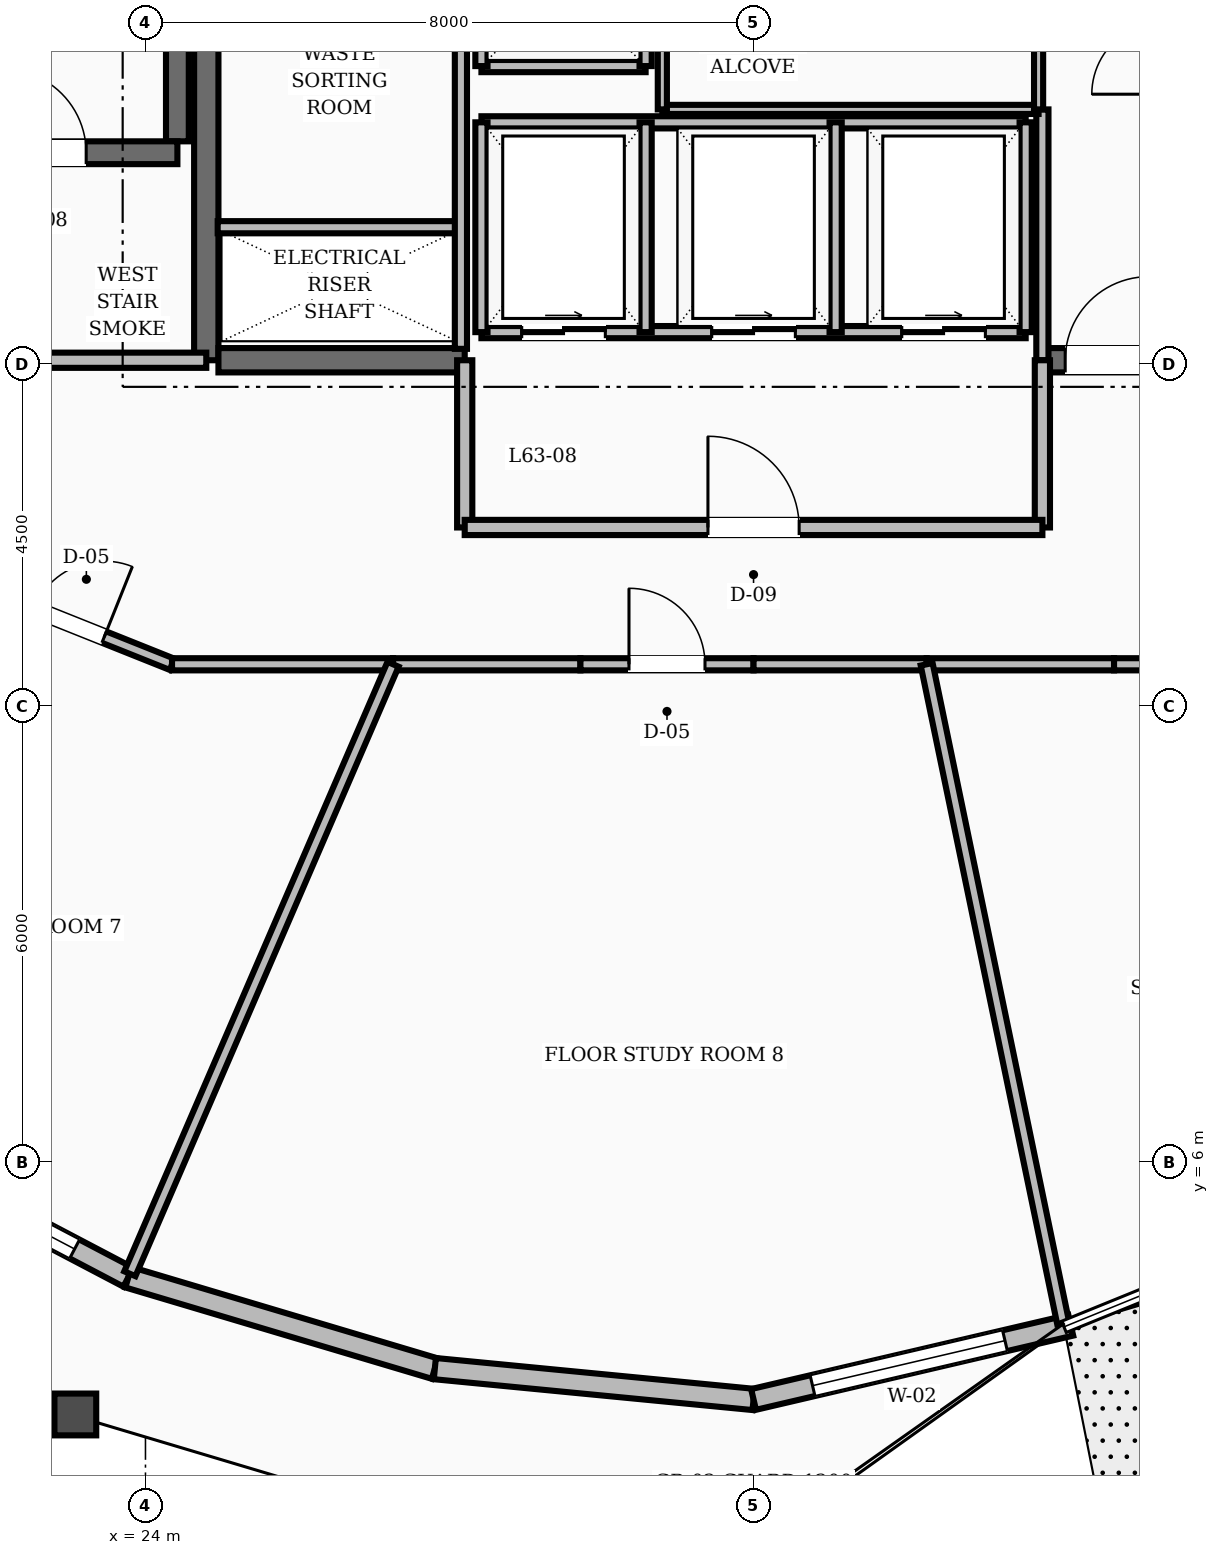
"""IFC4 building model, lengths in metres.
Left out: names, types, materials, properties, quantities, classifications, styles, units other than length and angle.
Written with IfcOpenShell. Run it as: python <this file> out.ifc"""

import sys

from ifc_helpers import new_model, si_unit, direction, frame, frame_2d, origin, place, context, subcontext, project, spatial, rectangle, extrude, element, fill, save


model = new_model("IFC4")
c1 = context("Model", 3, precision=1e-05, world=origin(), true_north=direction((0.0, 1.0)))
c2 = subcontext(c1, "Body", "Model", "MODEL_VIEW")
j1 = project(units=[si_unit("LENGTHUNIT", "METRE"), si_unit("PLANEANGLEUNIT", "RADIAN")], contexts=[c1])
p1 = place(None, origin())
s1 = spatial("IfcSite", under=j1, at=p1, CompositionType="ELEMENT")
p2 = place(p1, origin())
s2 = spatial("IfcBuilding", under=s1, at=p2, CompositionType="ELEMENT")
p3 = place(p2, frame((0.0, 0.0, 243.6)))
s3 = spatial("IfcBuildingStorey", under=s2, at=p3, CompositionType="ELEMENT", Elevation=243.6)
p4 = place(p3, frame((24.8, 16.55, 0.0), z_axis=(0.0, 0.0, 1.0), x_axis=(0.0, 1.0, 0.0)))
e1 = element("IfcWall", 1, at=p4, inside=s3, PredefinedType="SHEAR", context=c2, shape_type="SweptSolid", body=[
    extrude(rectangle(XDim=6.3, YDim=0.32, at=frame_2d((3.15, 0.0))), origin(), (0.0, 0.0, 1.0), 3.6),
])
p5 = place(p3, frame((24.96, 16.55, 0.0), z_axis=(0.0, 0.0, 1.0), x_axis=(1.0, 0.0, 0.0)))
e2 = element("IfcWall", 2, at=p5, inside=s3, PredefinedType="SHEAR", context=c2, shape_type="SweptSolid", body=[
    extrude(rectangle(XDim=3.24, YDim=0.32, at=frame_2d((1.62, 0.0))), origin(), (0.0, 0.0, 1.0), 3.6),
])
p6 = place(p3, frame((35.8, 16.55, 0.0), z_axis=(0.0, 0.0, 1.0), x_axis=(1.0, 0.0, 0.0)))
e3 = element("IfcWall", 3, at=p6, inside=s3, PredefinedType="SHEAR", context=c2, shape_type="SweptSolid", body=[
    extrude(rectangle(XDim=3.24, YDim=0.32, at=frame_2d((1.62, 0.0))), origin(), (0.0, 0.0, 1.0), 3.6),
])
p7 = place(p6, frame((0.3, 0.0, 0.0)))
e4 = element("IfcOpeningElement", 4, at=p7, cuts=e3, PredefinedType="OPENING", context=c2, shape_type="SweptSolid", body=[
    extrude(rectangle(XDim=1.1, YDim=2.1, at=frame_2d((0.55, 1.05))), frame((0.0, 0.17, 0.0), z_axis=(0.0, -1.0, 0.0), x_axis=(1.0, 0.0, 0.0)), (0.0, 0.0, 1.0), 0.34),
])
p8 = place(p3, frame((24.42, 19.43, 0.0), z_axis=(0.0, 0.0, 1.0), x_axis=(0.0, 1.0, 0.0)))
e5 = element("IfcWall", 5, at=p8, inside=s3, PredefinedType="SHEAR", context=c2, shape_type="SweptSolid", body=[
    extrude(rectangle(XDim=8.74, YDim=0.3, at=frame_2d((4.37, 0.0))), origin(), (0.0, 0.0, 1.0), 3.6),
])
p9 = place(p3, frame((20.82, 19.28, 0.0), z_axis=(0.0, 0.0, 1.0), x_axis=(1.0, 0.0, 0.0)))
e6 = element("IfcWall", 6, at=p9, inside=s3, PredefinedType="SHEAR", context=c2, shape_type="SweptSolid", body=[
    extrude(rectangle(XDim=3.6, YDim=0.3, at=frame_2d((1.8, 0.0))), origin(), (0.0, 0.0, 1.0), 3.6),
])
p10 = place(p9, frame((1.3, 0.0, 0.0)))
e7 = element("IfcOpeningElement", 7, at=p10, cuts=e6, PredefinedType="OPENING", context=c2, shape_type="SweptSolid", body=[
    extrude(rectangle(XDim=1.1, YDim=2.1, at=frame_2d((0.55, 1.05))), frame((0.0, 0.16, 0.0), z_axis=(0.0, -1.0, 0.0), x_axis=(1.0, 0.0, 0.0)), (0.0, 0.0, 1.0), 0.32),
])
p11 = place(p3, frame((20.059, 6.438, 0.0), z_axis=(0.0, 0.0, 1.0), x_axis=(0.885290153249, -0.46503907853, 0.0)))
e8 = element("IfcWall", 8, at=p11, inside=s3, PredefinedType="STANDARD", context=c2, shape_type="SweptSolid", body=[
    extrude(rectangle(XDim=4.197, YDim=0.28, at=frame_2d((2.099, 0.0))), origin(), (0.0, 0.0, 1.0), 2.88),
])
p12 = place(p11, frame((0.799, 0.0, 0.8)))
e9 = element("IfcOpeningElement", 9, at=p12, cuts=e8, PredefinedType="OPENING", context=c2, shape_type="SweptSolid", body=[
    extrude(rectangle(XDim=2.6, YDim=1.65, at=frame_2d((1.3, 0.825))), frame((0.0, 0.15, 0.0), z_axis=(0.0, -1.0, 0.0), x_axis=(1.0, 0.0, 0.0)), (0.0, 0.0, 1.0), 0.3),
])
p13 = place(p3, frame((23.775, 4.486, 0.0), z_axis=(0.0, 0.0, 1.0), x_axis=(0.958312014412, -0.285723788009, 0.0)))
e10 = element("IfcWall", 10, at=p13, inside=s3, PredefinedType="STANDARD", context=c2, shape_type="SweptSolid", body=[
    extrude(rectangle(XDim=4.207, YDim=0.28, at=frame_2d((2.104, 0.0))), origin(), (0.0, 0.0, 1.0), 2.88),
])
p14 = place(p3, frame((27.807, 3.284, 0.0), z_axis=(0.0, 0.0, 1.0), x_axis=(0.995350551252, -0.096318638497, 0.0)))
e11 = element("IfcWall", 11, at=p14, inside=s3, PredefinedType="STANDARD", context=c2, shape_type="SweptSolid", body=[
    extrude(rectangle(XDim=4.213, YDim=0.28, at=frame_2d((2.106, 0.0))), origin(), (0.0, 0.0, 1.0), 2.88),
])
p15 = place(p3, frame((32.0, 2.878, 0.0), z_axis=(0.0, 0.0, 1.0), x_axis=(0.973725543954, 0.227724757223, 0.0)))
e12 = element("IfcWall", 12, at=p15, inside=s3, PredefinedType="STANDARD", context=c2, shape_type="SweptSolid", body=[
    extrude(rectangle(XDim=4.286, YDim=0.28, at=frame_2d((2.143, 0.0))), origin(), (0.0, 0.0, 1.0), 2.88),
])
p16 = place(p15, frame((0.797, 0.0, 0.8)))
e13 = element("IfcOpeningElement", 13, at=p16, cuts=e12, PredefinedType="OPENING", context=c2, shape_type="SweptSolid", body=[
    extrude(rectangle(XDim=2.6, YDim=1.65, at=frame_2d((1.3, 0.825))), frame((0.0, 0.15, 0.0), z_axis=(0.0, -1.0, 0.0), x_axis=(1.0, 0.0, 0.0)), (0.0, 0.0, 1.0), 0.3),
])
p17 = place(p3, frame((20.82, 16.55, 0.0), z_axis=(0.0, 0.0, 1.0), x_axis=(1.0, 0.0, 0.0)))
e14 = element("IfcWall", 14, at=p17, inside=s3, PredefinedType="SOLIDWALL", context=c2, shape_type="SweptSolid", body=[
    extrude(rectangle(XDim=3.98, YDim=0.2, at=frame_2d((1.99, 0.0))), origin(), (0.0, 0.0, 1.0), 2.87),
])
p18 = place(p3, frame((35.8, 16.55, 0.0), z_axis=(0.0, 0.0, 1.0), x_axis=(0.0, 1.0, 0.0)))
e15 = element("IfcWall", 15, at=p18, inside=s3, PredefinedType="SOLIDWALL", context=c2, shape_type="SweptSolid", body=[
    extrude(rectangle(XDim=3.3, YDim=0.16, at=frame_2d((1.65, 0.0))), origin(), (0.0, 0.0, 1.0), 2.87),
])
for number, where, z_axis, x_axis in (
    (16, (28.2, 14.35, 0.0), (0.0, 0.0, 1.0), (0.0, 1.0, 0.0)),
    (17, (35.8, 14.35, 0.0), (0.0, 0.0, 1.0), (0.0, 1.0, 0.0)),
):
    element("IfcWall", number, at=place(p3, frame(where, z_axis=z_axis, x_axis=x_axis)), inside=s3, PredefinedType="SOLIDWALL", context=c2, shape_type="SweptSolid", body=[
        extrude(rectangle(XDim=2.2, YDim=0.2, at=frame_2d((1.1, 0.0))), origin(), (0.0, 0.0, 1.0), 2.87),
    ])
p19 = place(p3, frame((28.2, 14.35, 0.0), z_axis=(0.0, 0.0, 1.0), x_axis=(1.0, 0.0, 0.0)))
e18 = element("IfcWall", 18, at=p19, inside=s3, PredefinedType="SOLIDWALL", context=c2, shape_type="SweptSolid", body=[
    extrude(rectangle(XDim=7.6, YDim=0.2, at=frame_2d((3.8, 0.0))), origin(), (0.0, 0.0, 1.0), 2.87),
])
p20 = place(p19, frame((3.2, 0.0, 0.0)))
e19 = element("IfcOpeningElement", 19, at=p20, cuts=e18, PredefinedType="OPENING", context=c2, shape_type="SweptSolid", body=[
    extrude(rectangle(XDim=1.2, YDim=2.1, at=frame_2d((0.6, 1.05))), frame((0.0, 0.11, 0.0), z_axis=(0.0, -1.0, 0.0), x_axis=(1.0, 0.0, 0.0)), (0.0, 0.0, 1.0), 0.22),
])
for number, where, z_axis, x_axis in (
    (20, (28.42, 20.42, 0.0), (0.0, 0.0, 1.0), (1.0, 0.0, 0.0)),
    (21, (28.42, 20.42, 0.0), (0.0, 0.0, 1.0), (0.0, 1.0, 0.0)),
    (22, (30.58, 20.42, 0.0), (0.0, 0.0, 1.0), (0.0, 1.0, 0.0)),
):
    element("IfcWall", number, at=place(p3, frame(where, z_axis=z_axis, x_axis=x_axis)), inside=s3, PredefinedType="SOLIDWALL", context=c2, shape_type="SweptSolid", body=[
        extrude(rectangle(XDim=2.16, YDim=0.16, at=frame_2d((1.08, 0.0))), origin(), (0.0, 0.0, 1.0), 2.87),
    ])
p21 = place(p3, frame((28.42, 16.92, 0.0), z_axis=(0.0, 0.0, 1.0), x_axis=(1.0, 0.0, 0.0)))
e23 = element("IfcWall", 23, at=p21, inside=s3, PredefinedType="SOLIDWALL", context=c2, shape_type="SweptSolid", body=[
    extrude(rectangle(XDim=7.16, YDim=0.16, at=frame_2d((3.58, 0.0))), origin(), (0.0, 0.0, 1.0), 2.87),
])
p22 = place(p21, frame((0.53, 0.0, 0.0)))
e24 = element("IfcOpeningElement", 24, at=p22, cuts=e23, PredefinedType="OPENING", context=c2, shape_type="SweptSolid", body=[
    extrude(rectangle(XDim=1.1, YDim=2.15, at=frame_2d((0.55, 1.075))), frame((0.0, 0.09, 0.0), z_axis=(0.0, -1.0, 0.0), x_axis=(1.0, 0.0, 0.0)), (0.0, 0.0, 1.0), 0.18),
])
p23 = place(p21, frame((3.03, 0.0, 0.0)))
e25 = element("IfcOpeningElement", 25, at=p23, cuts=e23, PredefinedType="OPENING", context=c2, shape_type="SweptSolid", body=[
    extrude(rectangle(XDim=1.1, YDim=2.15, at=frame_2d((0.55, 1.075))), frame((0.0, 0.09, 0.0), z_axis=(0.0, -1.0, 0.0), x_axis=(1.0, 0.0, 0.0)), (0.0, 0.0, 1.0), 0.18),
])
p24 = place(p21, frame((5.53, 0.0, 0.0)))
e26 = element("IfcOpeningElement", 26, at=p24, cuts=e23, PredefinedType="OPENING", context=c2, shape_type="SweptSolid", body=[
    extrude(rectangle(XDim=1.1, YDim=2.15, at=frame_2d((0.55, 1.075))), frame((0.0, 0.09, 0.0), z_axis=(0.0, -1.0, 0.0), x_axis=(1.0, 0.0, 0.0)), (0.0, 0.0, 1.0), 0.18),
])
p25 = place(p3, frame((28.42, 19.68, 0.0), z_axis=(0.0, 0.0, 1.0), x_axis=(1.0, 0.0, 0.0)))
e27 = element("IfcWall", 27, at=p25, inside=s3, PredefinedType="SOLIDWALL", context=c2, shape_type="SweptSolid", body=[
    extrude(rectangle(XDim=7.16, YDim=0.16, at=frame_2d((3.58, 0.0))), origin(), (0.0, 0.0, 1.0), 2.87),
])
for number, where, z_axis, x_axis in (
    (28, (28.42, 16.92, 0.0), (0.0, 0.0, 1.0), (0.0, 1.0, 0.0)),
    (29, (30.58, 16.92, 0.0), (0.0, 0.0, 1.0), (0.0, 1.0, 0.0)),
    (30, (33.08, 16.92, 0.0), (0.0, 0.0, 1.0), (0.0, 1.0, 0.0)),
    (31, (35.58, 16.92, 0.0), (0.0, 0.0, 1.0), (0.0, 1.0, 0.0)),
):
    element("IfcWall", number, at=place(p3, frame(where, z_axis=z_axis, x_axis=x_axis)), inside=s3, PredefinedType="SOLIDWALL", context=c2, shape_type="SweptSolid", body=[
        extrude(rectangle(XDim=2.76, YDim=0.16, at=frame_2d((1.38, 0.0))), origin(), (0.0, 0.0, 1.0), 2.87),
    ])
p26 = place(p3, frame((30.8, 19.85, 0.0), z_axis=(0.0, 0.0, 1.0), x_axis=(1.0, 0.0, 0.0)))
e32 = element("IfcWall", 32, at=p26, inside=s3, PredefinedType="PARTITIONING", context=c2, shape_type="SweptSolid", body=[
    extrude(rectangle(XDim=4.95, YDim=0.12, at=frame_2d((2.475, 0.0))), origin(), (0.0, 0.0, 1.0), 2.87),
])
for number, where, z_axis, x_axis in (
    (33, (30.8, 19.85, 0.0), (0.0, 0.0, 1.0), (0.0, 1.0, 0.0)),
    (34, (35.75, 19.85, 0.0), (0.0, 0.0, 1.0), (0.0, 1.0, 0.0)),
):
    element("IfcWall", number, at=place(p3, frame(where, z_axis=z_axis, x_axis=x_axis)), inside=s3, PredefinedType="PARTITIONING", context=c2, shape_type="SweptSolid", body=[
        extrude(rectangle(XDim=2.83, YDim=0.12, at=frame_2d((1.415, 0.0))), origin(), (0.0, 0.0, 1.0), 2.87),
    ])
p27 = place(p3, frame((24.95, 18.3, 0.0), z_axis=(0.0, 0.0, 1.0), x_axis=(1.0, 0.0, 0.0)))
e35 = element("IfcWall", 35, at=p27, inside=s3, PredefinedType="SOLIDWALL", context=c2, shape_type="SweptSolid", body=[
    extrude(rectangle(XDim=3.2, YDim=0.16, at=frame_2d((1.6, 0.0))), origin(), (0.0, 0.0, 1.0), 2.87),
])
p28 = place(p3, frame((28.15, 16.7, 0.0), z_axis=(0.0, 0.0, 1.0), x_axis=(0.0, 1.0, 0.0)))
e36 = element("IfcWall", 36, at=p28, inside=s3, PredefinedType="SOLIDWALL", context=c2, shape_type="SweptSolid", body=[
    extrude(rectangle(XDim=6.05, YDim=0.16, at=frame_2d((3.025, 0.0))), origin(), (0.0, 0.0, 1.0), 2.87),
])
p29 = place(p3, frame((21.635, 13.635, 0.0), z_axis=(0.0, 0.0, 1.0), x_axis=(0.92856882165, -0.371160266542, 0.0)))
e37 = element("IfcWall", 37, at=p29, inside=s3, PredefinedType="SOLIDWALL", context=c2, shape_type="SweptSolid", body=[
    extrude(rectangle(XDim=2.923, YDim=0.16, at=frame_2d((1.461, 0.0))), origin(), (0.0, 0.0, 1.0), 2.87),
])
p30 = place(p29, frame((0.962, 0.0, 0.0)))
e38 = element("IfcOpeningElement", 38, at=p30, cuts=e37, PredefinedType="OPENING", context=c2, shape_type="SweptSolid", body=[
    extrude(rectangle(XDim=1.0, YDim=2.1, at=frame_2d((0.5, 1.05))), frame((0.0, 0.09, 0.0), z_axis=(0.0, -1.0, 0.0), x_axis=(1.0, 0.0, 0.0)), (0.0, 0.0, 1.0), 0.18),
])
p31 = place(p3, frame((24.349, 12.55, 0.0), z_axis=(0.0, 0.0, 1.0), x_axis=(1.0, 0.0, 0.0)))
e39 = element("IfcWall", 39, at=p31, inside=s3, PredefinedType="SOLIDWALL", context=c2, shape_type="SweptSolid", body=[
    extrude(rectangle(XDim=2.908, YDim=0.16, at=frame_2d((1.454, 0.0))), origin(), (0.0, 0.0, 1.0), 2.87),
])
p32 = place(p3, frame((27.257, 12.55, 0.0), z_axis=(0.0, 0.0, 1.0), x_axis=(1.0, 0.0, 0.0)))
e40 = element("IfcWall", 40, at=p32, inside=s3, PredefinedType="SOLIDWALL", context=c2, shape_type="SweptSolid", body=[
    extrude(rectangle(XDim=2.465, YDim=0.16, at=frame_2d((1.232, 0.0))), origin(), (0.0, 0.0, 1.0), 2.87),
])
p33 = place(p3, frame((29.722, 12.55, 0.0), z_axis=(0.0, 0.0, 1.0), x_axis=(1.0, 0.0, 0.0)))
e41 = element("IfcWall", 41, at=p33, inside=s3, PredefinedType="SOLIDWALL", context=c2, shape_type="SweptSolid", body=[
    extrude(rectangle(XDim=2.278, YDim=0.16, at=frame_2d((1.139, 0.0))), origin(), (0.0, 0.0, 1.0), 2.87),
])
p34 = place(p33, frame((0.639, 0.0, 0.0)))
e42 = element("IfcOpeningElement", 42, at=p34, cuts=e41, PredefinedType="OPENING", context=c2, shape_type="SweptSolid", body=[
    extrude(rectangle(XDim=1.0, YDim=2.1, at=frame_2d((0.5, 1.05))), frame((0.0, 0.09, 0.0), z_axis=(0.0, -1.0, 0.0), x_axis=(1.0, 0.0, 0.0)), (0.0, 0.0, 1.0), 0.18),
])
p35 = place(p3, frame((32.0, 12.55, 0.0), z_axis=(0.0, 0.0, 1.0), x_axis=(1.0, 0.0, 0.0)))
e43 = element("IfcWall", 43, at=p35, inside=s3, PredefinedType="SOLIDWALL", context=c2, shape_type="SweptSolid", body=[
    extrude(rectangle(XDim=2.278, YDim=0.16, at=frame_2d((1.139, 0.0))), origin(), (0.0, 0.0, 1.0), 2.87),
])
p36 = place(p3, frame((34.278, 12.55, 0.0), z_axis=(0.0, 0.0, 1.0), x_axis=(1.0, 0.0, 0.0)))
e44 = element("IfcWall", 44, at=p36, inside=s3, PredefinedType="SOLIDWALL", context=c2, shape_type="SweptSolid", body=[
    extrude(rectangle(XDim=2.465, YDim=0.16, at=frame_2d((1.232, 0.0))), origin(), (0.0, 0.0, 1.0), 2.87),
])
p37 = place(p3, frame((36.743, 12.55, 0.0), z_axis=(0.0, 0.0, 1.0), x_axis=(1.0, 0.0, 0.0)))
e45 = element("IfcWall", 45, at=p37, inside=s3, PredefinedType="SOLIDWALL", context=c2, shape_type="SweptSolid", body=[
    extrude(rectangle(XDim=2.908, YDim=0.16, at=frame_2d((1.454, 0.0))), origin(), (0.0, 0.0, 1.0), 2.87),
])
p38 = place(p37, frame((0.954, 0.0, 0.0)))
e46 = element("IfcOpeningElement", 46, at=p38, cuts=e45, PredefinedType="OPENING", context=c2, shape_type="SweptSolid", body=[
    extrude(rectangle(XDim=1.0, YDim=2.1, at=frame_2d((0.5, 1.05))), frame((0.0, 0.09, 0.0), z_axis=(0.0, -1.0, 0.0), x_axis=(1.0, 0.0, 0.0)), (0.0, 0.0, 1.0), 0.18),
])
p39 = place(p3, frame((27.257, 12.55, 0.0), z_axis=(0.0, 0.0, 1.0), x_axis=(-0.396464931031, -0.918049867089, 0.0)))
e47 = element("IfcWall", 47, at=p39, inside=s3, PredefinedType="SOLIDWALL", context=c2, shape_type="SweptSolid", body=[
    extrude(rectangle(XDim=8.734, YDim=0.16, at=frame_2d((4.367, 0.0))), origin(), (0.0, 0.0, 1.0), 2.87),
])
p40 = place(p3, frame((34.278, 12.55, 0.0), z_axis=(0.0, 0.0, 1.0), x_axis=(0.202911120266, -0.979197159551, 0.0)))
e48 = element("IfcWall", 48, at=p40, inside=s3, PredefinedType="SOLIDWALL", context=c2, shape_type="SweptSolid", body=[
    extrude(rectangle(XDim=8.852, YDim=0.16, at=frame_2d((4.426, 0.0))), origin(), (0.0, 0.0, 1.0), 2.87),
])
p41 = place(p12, origin())
e49 = element("IfcWindow", 49, at=p41, inside=s3, PartitioningType="SINGLE_PANEL", PredefinedType="WINDOW", context=c2, shape_type="SweptSolid", body=[
    extrude(rectangle(XDim=2.6, YDim=1.65, at=frame_2d((1.3, 0.825))), frame((0.0, 0.03, 0.0), z_axis=(0.0, -1.0, 0.0), x_axis=(1.0, 0.0, 0.0)), (0.0, 0.0, 1.0), 0.06),
])
fill(e9, e49)
p42 = place(p16, origin())
e50 = element("IfcWindow", 50, at=p42, inside=s3, PartitioningType="SINGLE_PANEL", PredefinedType="WINDOW", context=c2, shape_type="SweptSolid", body=[
    extrude(rectangle(XDim=2.6, YDim=1.65, at=frame_2d((1.3, 0.825))), frame((0.0, 0.03, 0.0), z_axis=(0.0, -1.0, 0.0), x_axis=(1.0, 0.0, 0.0)), (0.0, 0.0, 1.0), 0.06),
])
fill(e13, e50)
p43 = place(p10, origin())
e51 = element("IfcDoor", 51, at=p43, inside=s3, OperationType="SINGLE_SWING_LEFT", PredefinedType="DOOR", context=c2, shape_type="SweptSolid", body=[
    extrude(rectangle(XDim=1.1, YDim=2.1, at=frame_2d((0.55, 1.05))), frame((0.0, 0.025, 0.0), z_axis=(0.0, -1.0, 0.0), x_axis=(1.0, 0.0, 0.0)), (0.0, 0.0, 1.0), 0.05),
])
fill(e7, e51)
p44 = place(p7, origin())
e52 = element("IfcDoor", 52, at=p44, inside=s3, OperationType="SINGLE_SWING_RIGHT", PredefinedType="DOOR", context=c2, shape_type="SweptSolid", body=[
    extrude(rectangle(XDim=1.1, YDim=2.1, at=frame_2d((0.55, 1.05))), frame((0.0, 0.025, 0.0), z_axis=(0.0, -1.0, 0.0), x_axis=(1.0, 0.0, 0.0)), (0.0, 0.0, 1.0), 0.05),
])
fill(e4, e52)
p45 = place(p20, origin())
e53 = element("IfcDoor", 53, at=p45, inside=s3, OperationType="SINGLE_SWING_LEFT", PredefinedType="DOOR", context=c2, shape_type="SweptSolid", body=[
    extrude(rectangle(XDim=1.2, YDim=2.1, at=frame_2d((0.6, 1.05))), frame((0.0, 0.025, 0.0), z_axis=(0.0, -1.0, 0.0), x_axis=(1.0, 0.0, 0.0)), (0.0, 0.0, 1.0), 0.05),
])
fill(e19, e53)
p46 = place(p22, origin())
e54 = element("IfcDoor", 54, at=p46, inside=s3, OperationType="SLIDING_TO_RIGHT", PredefinedType="DOOR", context=c2, shape_type="SweptSolid", body=[
    extrude(rectangle(XDim=1.1, YDim=2.15, at=frame_2d((0.55, 1.075))), frame((0.0, 0.025, 0.0), z_axis=(0.0, -1.0, 0.0), x_axis=(1.0, 0.0, 0.0)), (0.0, 0.0, 1.0), 0.05),
])
fill(e24, e54)
p47 = place(p23, origin())
e55 = element("IfcDoor", 55, at=p47, inside=s3, OperationType="SLIDING_TO_RIGHT", PredefinedType="DOOR", context=c2, shape_type="SweptSolid", body=[
    extrude(rectangle(XDim=1.1, YDim=2.15, at=frame_2d((0.55, 1.075))), frame((0.0, 0.025, 0.0), z_axis=(0.0, -1.0, 0.0), x_axis=(1.0, 0.0, 0.0)), (0.0, 0.0, 1.0), 0.05),
])
fill(e25, e55)
p48 = place(p24, origin())
e56 = element("IfcDoor", 56, at=p48, inside=s3, OperationType="SLIDING_TO_RIGHT", PredefinedType="DOOR", context=c2, shape_type="SweptSolid", body=[
    extrude(rectangle(XDim=1.1, YDim=2.15, at=frame_2d((0.55, 1.075))), frame((0.0, 0.025, 0.0), z_axis=(0.0, -1.0, 0.0), x_axis=(1.0, 0.0, 0.0)), (0.0, 0.0, 1.0), 0.05),
])
fill(e26, e56)
p49 = place(p30, origin())
e57 = element("IfcDoor", 57, at=p49, inside=s3, OperationType="SINGLE_SWING_RIGHT", PredefinedType="DOOR", context=c2, shape_type="SweptSolid", body=[
    extrude(rectangle(XDim=1.0, YDim=2.1, at=frame_2d((0.5, 1.05))), frame((0.0, 0.025, 0.0), z_axis=(0.0, -1.0, 0.0), x_axis=(1.0, 0.0, 0.0)), (0.0, 0.0, 1.0), 0.05),
])
fill(e38, e57)
p50 = place(p34, origin())
e58 = element("IfcDoor", 58, at=p50, inside=s3, OperationType="SINGLE_SWING_LEFT", PredefinedType="DOOR", context=c2, shape_type="SweptSolid", body=[
    extrude(rectangle(XDim=1.0, YDim=2.1, at=frame_2d((0.5, 1.05))), frame((0.0, 0.025, 0.0), z_axis=(0.0, -1.0, 0.0), x_axis=(1.0, 0.0, 0.0)), (0.0, 0.0, 1.0), 0.05),
])
fill(e42, e58)
save(model, sys.argv[1])
